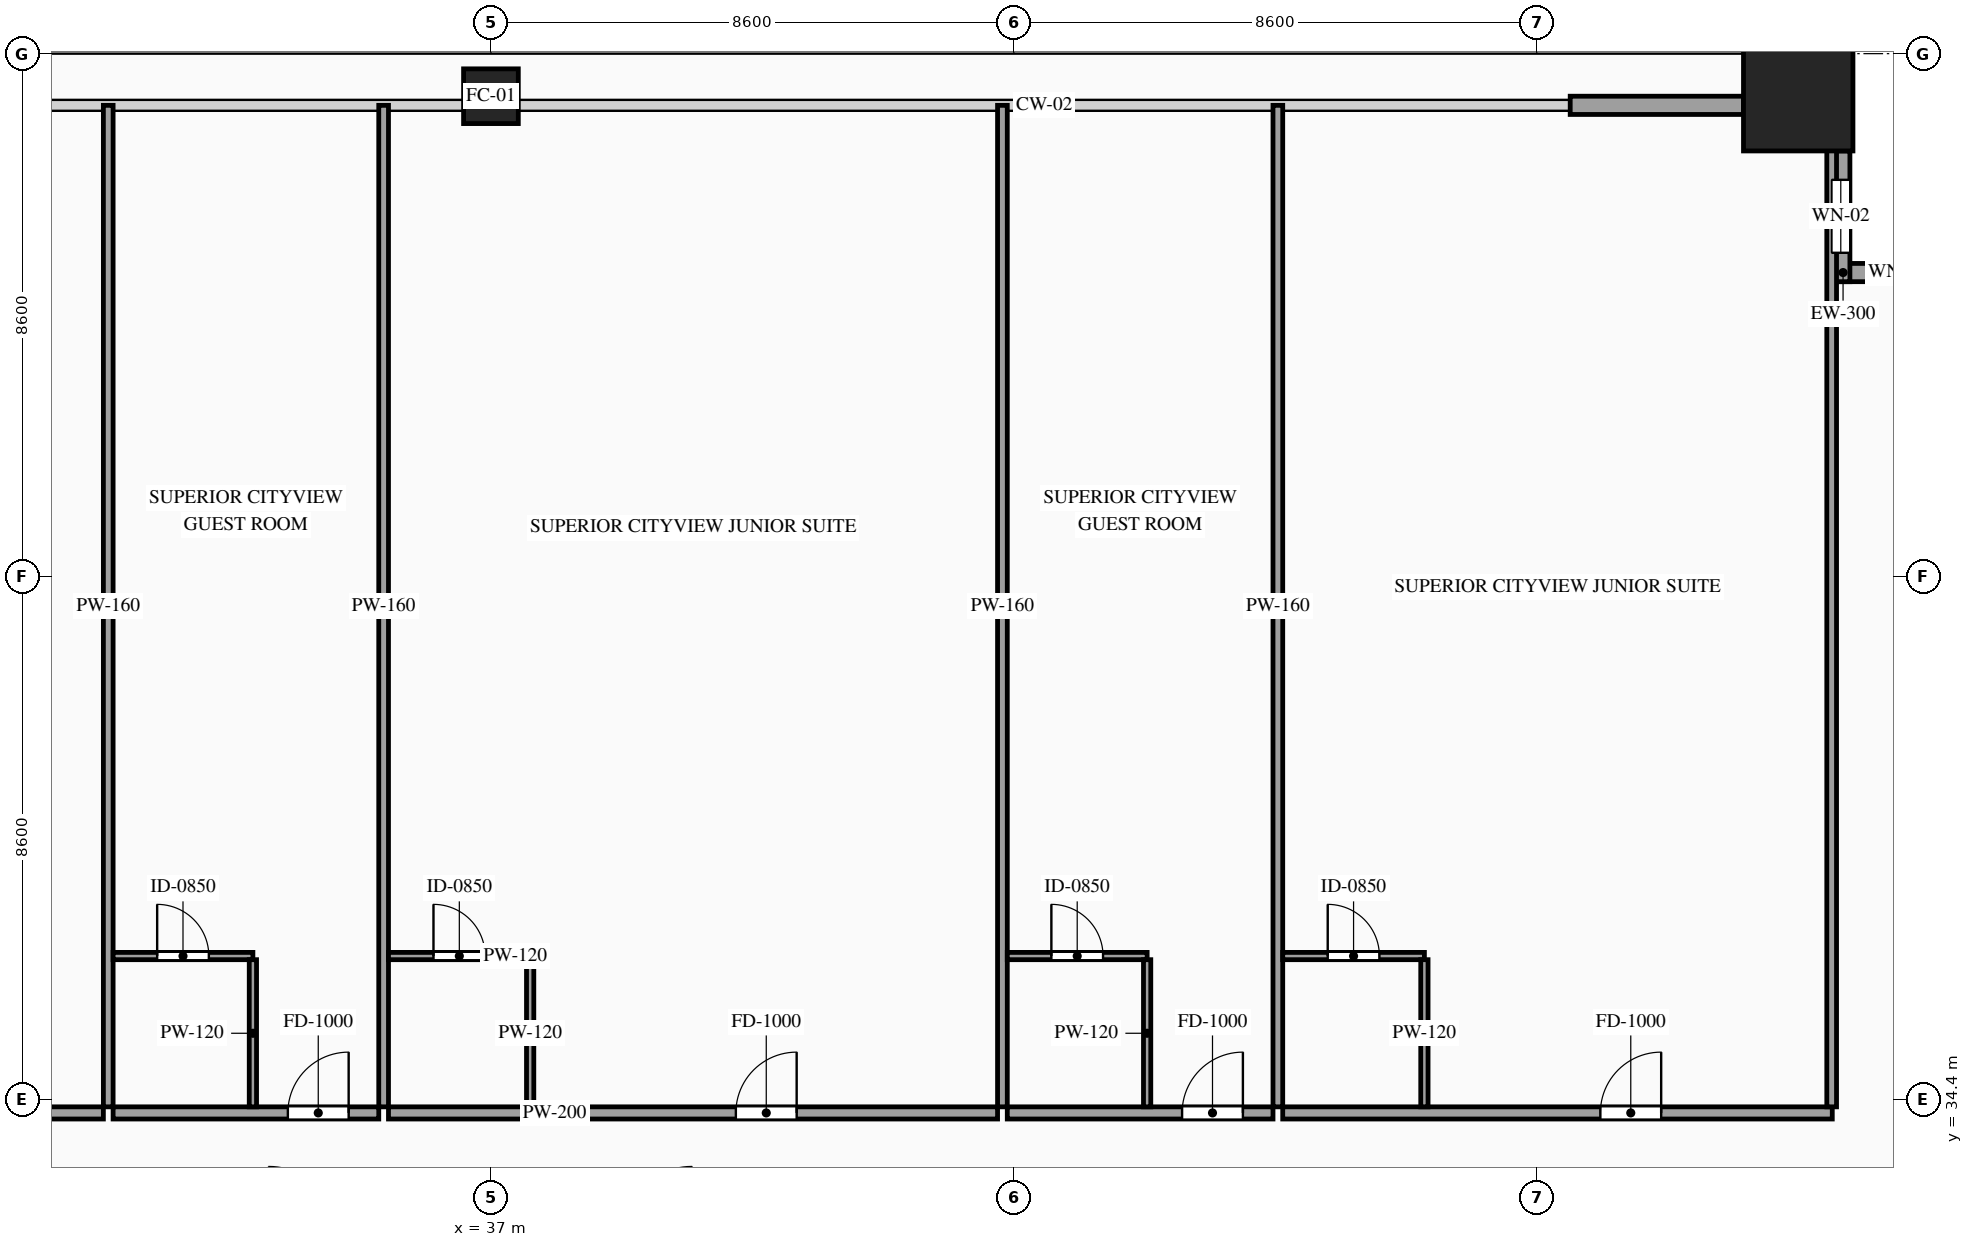
"""IFC4 building model, lengths in metres.
Left out: names, types, materials, properties, quantities, classifications, styles, units other than length and angle.
Written with IfcOpenShell. Run it as: python <this file> out.ifc"""

import sys

from ifc_helpers import new_model, si_unit, direction, frame, frame_2d, origin, origin_2d, place, context, subcontext, project, spatial, rectangle, hollow_rectangle, extrude, source, transform, mapped, element, fill, save


model = new_model("IFC4")
c1 = context("Model", 3, precision=1e-05, world=origin(), true_north=direction((0.0, 1.0)))
c2 = subcontext(c1, "Body", "Model", "MODEL_VIEW")
j1 = project(units=[si_unit("LENGTHUNIT", "METRE"), si_unit("PLANEANGLEUNIT", "RADIAN")], contexts=[c1])
p1 = place(None, origin())
s1 = spatial("IfcSite", under=j1, at=p1, CompositionType="ELEMENT")
p2 = place(p1, origin())
s2 = spatial("IfcBuilding", under=s1, at=p2, CompositionType="ELEMENT")
p3 = place(p2, frame((0.0, 0.0, 74.8)))
s3 = spatial("IfcBuildingStorey", under=s2, at=p3, CompositionType="ELEMENT", Elevation=74.8)
m1 = source(origin(), c2, "Body", "SweptSolid", [
    extrude(hollow_rectangle(XDim=0.9, YDim=0.9, WallThickness=0.042, at=origin_2d()), origin(), (0.0, 0.0, 1.0), 3.6),
])
p4 = place(p3, frame((37.0, 50.9, 0.0), z_axis=(0.0, 0.0, 1.0), x_axis=(1.0, 0.0, 0.0)))
e1 = element("IfcColumn", 1, at=p4, inside=s3, PredefinedType="COLUMN", context=c2, shape_type="MappedRepresentation", body=[
    mapped(m1, transform((0.0, 0.0, 0.0), scale=1.0)),
])
m2 = source(origin(), c2, "Body", "SweptSolid", [
    extrude(hollow_rectangle(XDim=1.8, YDim=1.8, WallThickness=0.08, at=origin_2d()), origin(), (0.0, 0.0, 1.0), 3.6),
])
p5 = place(p3, frame((58.5, 50.9, 0.0), z_axis=(0.0, 0.0, 1.0), x_axis=(1.0, 0.0, 0.0)))
e2 = element("IfcColumn", 2, at=p5, inside=s3, PredefinedType="COLUMN", context=c2, shape_type="MappedRepresentation", body=[
    mapped(m2, transform((0.0, 0.0, 0.0), scale=1.0)),
])
p6 = place(p3, frame((61.2, 48.0, 0.0), z_axis=(0.0, 0.0, 1.0), x_axis=(-1.0, 0.0, 0.0)))
e3 = element("IfcWall", 3, at=p6, inside=s3, PredefinedType="SOLIDWALL", context=c2, shape_type="SweptSolid", body=[
    extrude(rectangle(XDim=2.15, YDim=0.3, at=frame_2d((1.075, 0.0))), origin(), (0.0, 0.0, 1.0), 3.38),
])
p7 = place(p6, frame((0.625, 0.0, 0.85)))
e4 = element("IfcOpeningElement", 4, at=p7, cuts=e3, PredefinedType="OPENING", context=c2, shape_type="SweptSolid", body=[
    extrude(rectangle(XDim=0.9, YDim=1.5, at=frame_2d((0.45, 0.75))), frame((0.0, 0.165, 0.0), z_axis=(0.0, -1.0, 0.0), x_axis=(1.0, 0.0, 0.0)), (0.0, 0.0, 1.0), 0.33),
])
p8 = place(p3, frame((59.2, 47.85, 0.0), z_axis=(0.0, 0.0, 1.0), x_axis=(0.0, 1.0, 0.0)))
e5 = element("IfcWall", 5, at=p8, inside=s3, PredefinedType="SOLIDWALL", context=c2, shape_type="SweptSolid", body=[
    extrude(rectangle(XDim=2.15, YDim=0.3, at=frame_2d((1.075, 0.0))), origin(), (0.0, 0.0, 1.0), 3.38),
])
p9 = place(p8, frame((0.475, 0.0, 0.85)))
e6 = element("IfcOpeningElement", 6, at=p9, cuts=e5, PredefinedType="OPENING", context=c2, shape_type="SweptSolid", body=[
    extrude(rectangle(XDim=1.2, YDim=2.1, at=frame_2d((0.6, 1.05))), frame((0.0, 0.165, 0.0), z_axis=(0.0, -1.0, 0.0), x_axis=(1.0, 0.0, 0.0)), (0.0, 0.0, 1.0), 0.33),
])
m3 = source(origin(), c2, "Body", "SweptSolid", [
    extrude(rectangle(XDim=2.85, YDim=0.3, at=frame_2d((1.425, 0.0))), origin(), (0.0, 0.0, 1.0), 2.775),
])
p10 = place(p3, frame((54.75, 50.75, 0.0), z_axis=(0.0, 0.0, 1.0), x_axis=(1.0, 0.0, 0.0)))
e7 = element("IfcWall", 7, at=p10, inside=s3, PredefinedType="SOLIDWALL", context=c2, shape_type="MappedRepresentation", body=[
    mapped(m3, transform((0.0, 0.0, 0.0), scale=1.0)),
])
p11 = place(p3, frame((21.197, 34.18, 0.0), z_axis=(0.0, 0.0, 1.0), x_axis=(1.0, 0.0, 0.0)))
e8 = element("IfcWall", 8, at=p11, inside=s3, PredefinedType="PARTITIONING", context=c2, shape_type="SweptSolid", body=[
    extrude(rectangle(XDim=9.429, YDim=0.2, at=frame_2d((4.714, 0.0))), origin(), (0.0, 0.0, 1.0), 3.38),
])
p12 = place(p11, frame((5.42, 0.0, 0.0)))
e9 = element("IfcOpeningElement", 9, at=p12, cuts=e8, PredefinedType="OPENING", context=c2, shape_type="SweptSolid", body=[
    extrude(rectangle(XDim=1.0, YDim=2.2, at=frame_2d((0.5, 1.1))), frame((0.0, 0.115, 0.0), z_axis=(0.0, -1.0, 0.0), x_axis=(1.0, 0.0, 0.0)), (0.0, 0.0, 1.0), 0.23),
])
m4 = source(origin(), c2, "Body", "SweptSolid", [
    extrude(rectangle(XDim=16.47, YDim=0.16, at=frame_2d((8.235, 0.0))), origin(), (0.0, 0.0, 1.0), 3.38),
])
p13 = place(p3, frame((30.706, 34.28, 0.0), z_axis=(0.0, 0.0, 1.0), x_axis=(0.0, 1.0, 0.0)))
e10 = element("IfcWall", 10, at=p13, inside=s3, PredefinedType="PARTITIONING", context=c2, shape_type="MappedRepresentation", body=[
    mapped(m4, transform((0.0, 0.0, 0.0), scale=1.0)),
])
p14 = place(p3, frame((30.786, 34.18, 0.0), z_axis=(0.0, 0.0, 1.0), x_axis=(1.0, 0.0, 0.0)))
e11 = element("IfcWall", 11, at=p14, inside=s3, PredefinedType="PARTITIONING", context=c2, shape_type="SweptSolid", body=[
    extrude(rectangle(XDim=4.369, YDim=0.2, at=frame_2d((2.185, 0.0))), origin(), (0.0, 0.0, 1.0), 3.38),
])
p15 = place(p14, frame((2.874, 0.0, 0.0)))
e12 = element("IfcOpeningElement", 12, at=p15, cuts=e11, PredefinedType="OPENING", context=c2, shape_type="SweptSolid", body=[
    extrude(rectangle(XDim=1.0, YDim=2.2, at=frame_2d((0.5, 1.1))), frame((0.0, 0.115, 0.0), z_axis=(0.0, -1.0, 0.0), x_axis=(1.0, 0.0, 0.0)), (0.0, 0.0, 1.0), 0.23),
])
p16 = place(p3, frame((35.235, 34.28, 0.0), z_axis=(0.0, 0.0, 1.0), x_axis=(0.0, 1.0, 0.0)))
e13 = element("IfcWall", 13, at=p16, inside=s3, PredefinedType="PARTITIONING", context=c2, shape_type="MappedRepresentation", body=[
    mapped(m4, transform((0.0, 0.0, 0.0), scale=1.0)),
])
p17 = place(p3, frame((30.786, 36.76, 0.0), z_axis=(0.0, 0.0, 1.0), x_axis=(1.0, 0.0, 0.0)))
e14 = element("IfcWall", 14, at=p17, inside=s3, PredefinedType="PARTITIONING", context=c2, shape_type="SweptSolid", body=[
    extrude(rectangle(XDim=2.299, YDim=0.12, at=frame_2d((1.149, 0.0))), origin(), (0.0, 0.0, 1.0), 3.38),
])
p18 = place(p17, frame((0.725, 0.0, 0.0)))
e15 = element("IfcOpeningElement", 15, at=p18, cuts=e14, PredefinedType="OPENING", context=c2, shape_type="SweptSolid", body=[
    extrude(rectangle(XDim=0.85, YDim=2.1, at=frame_2d((0.425, 1.05))), frame((0.0, 0.075, 0.0), z_axis=(0.0, -1.0, 0.0), x_axis=(1.0, 0.0, 0.0)), (0.0, 0.0, 1.0), 0.15),
])
m5 = source(origin(), c2, "Body", "SweptSolid", [
    extrude(rectangle(XDim=2.42, YDim=0.12, at=frame_2d((1.21, 0.0))), origin(), (0.0, 0.0, 1.0), 3.38),
])
p19 = place(p3, frame((33.085, 34.28, 0.0), z_axis=(0.0, 0.0, 1.0), x_axis=(0.0, 1.0, 0.0)))
e16 = element("IfcWall", 16, at=p19, inside=s3, PredefinedType="PARTITIONING", context=c2, shape_type="MappedRepresentation", body=[
    mapped(m5, transform((0.0, 0.0, 0.0), scale=1.0)),
])
p20 = place(p3, frame((35.315, 34.18, 0.0), z_axis=(0.0, 0.0, 1.0), x_axis=(1.0, 0.0, 0.0)))
e17 = element("IfcWall", 17, at=p20, inside=s3, PredefinedType="PARTITIONING", context=c2, shape_type="SweptSolid", body=[
    extrude(rectangle(XDim=10.017, YDim=0.2, at=frame_2d((5.009, 0.0))), origin(), (0.0, 0.0, 1.0), 3.38),
])
p21 = place(p20, frame((5.713, 0.0, 0.0)))
e18 = element("IfcOpeningElement", 18, at=p21, cuts=e17, PredefinedType="OPENING", context=c2, shape_type="SweptSolid", body=[
    extrude(rectangle(XDim=1.0, YDim=2.2, at=frame_2d((0.5, 1.1))), frame((0.0, 0.115, 0.0), z_axis=(0.0, -1.0, 0.0), x_axis=(1.0, 0.0, 0.0)), (0.0, 0.0, 1.0), 0.23),
])
p22 = place(p3, frame((45.412, 34.28, 0.0), z_axis=(0.0, 0.0, 1.0), x_axis=(0.0, 1.0, 0.0)))
e19 = element("IfcWall", 19, at=p22, inside=s3, PredefinedType="PARTITIONING", context=c2, shape_type="MappedRepresentation", body=[
    mapped(m4, transform((0.0, 0.0, 0.0), scale=1.0)),
])
p23 = place(p3, frame((35.315, 36.76, 0.0), z_axis=(0.0, 0.0, 1.0), x_axis=(1.0, 0.0, 0.0)))
e20 = element("IfcWall", 20, at=p23, inside=s3, PredefinedType="PARTITIONING", context=c2, shape_type="SweptSolid", body=[
    extrude(rectangle(XDim=2.33, YDim=0.12, at=frame_2d((1.165, 0.0))), origin(), (0.0, 0.0, 1.0), 3.38),
])
p24 = place(p23, frame((0.74, 0.0, 0.0)))
e21 = element("IfcOpeningElement", 21, at=p24, cuts=e20, PredefinedType="OPENING", context=c2, shape_type="SweptSolid", body=[
    extrude(rectangle(XDim=0.85, YDim=2.1, at=frame_2d((0.425, 1.05))), frame((0.0, 0.075, 0.0), z_axis=(0.0, -1.0, 0.0), x_axis=(1.0, 0.0, 0.0)), (0.0, 0.0, 1.0), 0.15),
])
p25 = place(p3, frame((37.645, 34.28, 0.0), z_axis=(0.0, 0.0, 1.0), x_axis=(0.0, 1.0, 0.0)))
e22 = element("IfcWall", 22, at=p25, inside=s3, PredefinedType="PARTITIONING", context=c2, shape_type="MappedRepresentation", body=[
    mapped(m5, transform((0.0, 0.0, 0.0), scale=1.0)),
])
p26 = place(p3, frame((45.492, 34.18, 0.0), z_axis=(0.0, 0.0, 1.0), x_axis=(1.0, 0.0, 0.0)))
e23 = element("IfcWall", 23, at=p26, inside=s3, PredefinedType="PARTITIONING", context=c2, shape_type="SweptSolid", body=[
    extrude(rectangle(XDim=4.37, YDim=0.2, at=frame_2d((2.185, 0.0))), origin(), (0.0, 0.0, 1.0), 3.38),
])
p27 = place(p26, frame((2.875, 0.0, 0.0)))
e24 = element("IfcOpeningElement", 24, at=p27, cuts=e23, PredefinedType="OPENING", context=c2, shape_type="SweptSolid", body=[
    extrude(rectangle(XDim=1.0, YDim=2.2, at=frame_2d((0.5, 1.1))), frame((0.0, 0.115, 0.0), z_axis=(0.0, -1.0, 0.0), x_axis=(1.0, 0.0, 0.0)), (0.0, 0.0, 1.0), 0.23),
])
p28 = place(p3, frame((49.942, 34.28, 0.0), z_axis=(0.0, 0.0, 1.0), x_axis=(0.0, 1.0, 0.0)))
e25 = element("IfcWall", 25, at=p28, inside=s3, PredefinedType="PARTITIONING", context=c2, shape_type="MappedRepresentation", body=[
    mapped(m4, transform((0.0, 0.0, 0.0), scale=1.0)),
])
p29 = place(p3, frame((45.492, 36.76, 0.0), z_axis=(0.0, 0.0, 1.0), x_axis=(1.0, 0.0, 0.0)))
e26 = element("IfcWall", 26, at=p29, inside=s3, PredefinedType="PARTITIONING", context=c2, shape_type="SweptSolid", body=[
    extrude(rectangle(XDim=2.3, YDim=0.12, at=frame_2d((1.15, 0.0))), origin(), (0.0, 0.0, 1.0), 3.38),
])
p30 = place(p29, frame((0.725, 0.0, 0.0)))
e27 = element("IfcOpeningElement", 27, at=p30, cuts=e26, PredefinedType="OPENING", context=c2, shape_type="SweptSolid", body=[
    extrude(rectangle(XDim=0.85, YDim=2.1, at=frame_2d((0.425, 1.05))), frame((0.0, 0.075, 0.0), z_axis=(0.0, -1.0, 0.0), x_axis=(1.0, 0.0, 0.0)), (0.0, 0.0, 1.0), 0.15),
])
p31 = place(p3, frame((47.792, 34.28, 0.0), z_axis=(0.0, 0.0, 1.0), x_axis=(0.0, 1.0, 0.0)))
e28 = element("IfcWall", 28, at=p31, inside=s3, PredefinedType="PARTITIONING", context=c2, shape_type="MappedRepresentation", body=[
    mapped(m5, transform((0.0, 0.0, 0.0), scale=1.0)),
])
p32 = place(p3, frame((50.022, 34.18, 0.0), z_axis=(0.0, 0.0, 1.0), x_axis=(1.0, 0.0, 0.0)))
e29 = element("IfcWall", 29, at=p32, inside=s3, PredefinedType="PARTITIONING", context=c2, shape_type="SweptSolid", body=[
    extrude(rectangle(XDim=9.038, YDim=0.2, at=frame_2d((4.519, 0.0))), origin(), (0.0, 0.0, 1.0), 3.38),
])
p33 = place(p32, frame((5.224, 0.0, 0.0)))
e30 = element("IfcOpeningElement", 30, at=p33, cuts=e29, PredefinedType="OPENING", context=c2, shape_type="SweptSolid", body=[
    extrude(rectangle(XDim=1.0, YDim=2.2, at=frame_2d((0.5, 1.1))), frame((0.0, 0.115, 0.0), z_axis=(0.0, -1.0, 0.0), x_axis=(1.0, 0.0, 0.0)), (0.0, 0.0, 1.0), 0.23),
])
m6 = source(origin(), c2, "Body", "SweptSolid", [
    extrude(rectangle(XDim=16.32, YDim=0.16, at=frame_2d((8.16, 0.0))), origin(), (0.0, 0.0, 1.0), 3.38),
])
p34 = place(p3, frame((59.05, 34.28, 0.0), z_axis=(0.0, 0.0, 1.0), x_axis=(0.0, 1.0, 0.0)))
e31 = element("IfcWall", 31, at=p34, inside=s3, PredefinedType="PARTITIONING", context=c2, shape_type="MappedRepresentation", body=[
    mapped(m6, transform((0.0, 0.0, 0.0), scale=1.0)),
])
p35 = place(p3, frame((50.022, 36.76, 0.0), z_axis=(0.0, 0.0, 1.0), x_axis=(1.0, 0.0, 0.0)))
e32 = element("IfcWall", 32, at=p35, inside=s3, PredefinedType="PARTITIONING", context=c2, shape_type="SweptSolid", body=[
    extrude(rectangle(XDim=2.33, YDim=0.12, at=frame_2d((1.165, 0.0))), origin(), (0.0, 0.0, 1.0), 3.38),
])
p36 = place(p35, frame((0.74, 0.0, 0.0)))
e33 = element("IfcOpeningElement", 33, at=p36, cuts=e32, PredefinedType="OPENING", context=c2, shape_type="SweptSolid", body=[
    extrude(rectangle(XDim=0.85, YDim=2.1, at=frame_2d((0.425, 1.05))), frame((0.0, 0.075, 0.0), z_axis=(0.0, -1.0, 0.0), x_axis=(1.0, 0.0, 0.0)), (0.0, 0.0, 1.0), 0.15),
])
p37 = place(p3, frame((52.352, 34.28, 0.0), z_axis=(0.0, 0.0, 1.0), x_axis=(0.0, 1.0, 0.0)))
e34 = element("IfcWall", 34, at=p37, inside=s3, PredefinedType="PARTITIONING", context=c2, shape_type="MappedRepresentation", body=[
    mapped(m5, transform((0.0, 0.0, 0.0), scale=1.0)),
])
m7 = source(origin(), c2, "Body", "SweptSolid", [
    extrude(rectangle(XDim=0.9, YDim=1.5, at=frame_2d((0.45, 0.75))), frame((0.0, 0.03, 0.0), z_axis=(0.0, -1.0, 0.0), x_axis=(1.0, 0.0, 0.0)), (0.0, 0.0, 1.0), 0.06),
])
p38 = place(p7, origin())
e35 = element("IfcWindow", 35, at=p38, inside=s3, PartitioningType="SINGLE_PANEL", PredefinedType="WINDOW", context=c2, shape_type="MappedRepresentation", body=[
    mapped(m7, transform((0.0, 0.0, 0.0), scale=1.0)),
])
fill(e4, e35)
m8 = source(origin(), c2, "Body", "SweptSolid", [
    extrude(rectangle(XDim=1.2, YDim=2.1, at=frame_2d((0.6, 1.05))), frame((0.0, 0.03, 0.0), z_axis=(0.0, -1.0, 0.0), x_axis=(1.0, 0.0, 0.0)), (0.0, 0.0, 1.0), 0.06),
])
p39 = place(p9, origin())
e36 = element("IfcWindow", 36, at=p39, inside=s3, PartitioningType="SINGLE_PANEL", PredefinedType="WINDOW", context=c2, shape_type="MappedRepresentation", body=[
    mapped(m8, transform((0.0, 0.0, 0.0), scale=1.0)),
])
fill(e6, e36)
m9 = source(origin(), c2, "Body", "SweptSolid", [
    extrude(rectangle(XDim=1.0, YDim=2.2, at=frame_2d((0.5, 1.1))), frame((0.0, 0.025, 0.0), z_axis=(0.0, -1.0, 0.0), x_axis=(1.0, 0.0, 0.0)), (0.0, 0.0, 1.0), 0.05),
])
p40 = place(p15, origin())
e37 = element("IfcDoor", 37, at=p40, inside=s3, OperationType="SINGLE_SWING_RIGHT", PredefinedType="DOOR", context=c2, shape_type="MappedRepresentation", body=[
    mapped(m9, transform((0.0, 0.0, 0.0), scale=1.0)),
])
fill(e12, e37)
m10 = source(origin(), c2, "Body", "SweptSolid", [
    extrude(rectangle(XDim=0.85, YDim=2.1, at=frame_2d((0.425, 1.05))), frame((0.0, 0.025, 0.0), z_axis=(0.0, -1.0, 0.0), x_axis=(1.0, 0.0, 0.0)), (0.0, 0.0, 1.0), 0.05),
])
p41 = place(p18, origin())
e38 = element("IfcDoor", 38, at=p41, inside=s3, OperationType="SINGLE_SWING_LEFT", PredefinedType="DOOR", context=c2, shape_type="MappedRepresentation", body=[
    mapped(m10, transform((0.0, 0.0, 0.0), scale=1.0)),
])
fill(e15, e38)
p42 = place(p21, origin())
e39 = element("IfcDoor", 39, at=p42, inside=s3, OperationType="SINGLE_SWING_RIGHT", PredefinedType="DOOR", context=c2, shape_type="MappedRepresentation", body=[
    mapped(m9, transform((0.0, 0.0, 0.0), scale=1.0)),
])
fill(e18, e39)
p43 = place(p24, origin())
e40 = element("IfcDoor", 40, at=p43, inside=s3, OperationType="SINGLE_SWING_LEFT", PredefinedType="DOOR", context=c2, shape_type="MappedRepresentation", body=[
    mapped(m10, transform((0.0, 0.0, 0.0), scale=1.0)),
])
fill(e21, e40)
p44 = place(p27, origin())
e41 = element("IfcDoor", 41, at=p44, inside=s3, OperationType="SINGLE_SWING_RIGHT", PredefinedType="DOOR", context=c2, shape_type="MappedRepresentation", body=[
    mapped(m9, transform((0.0, 0.0, 0.0), scale=1.0)),
])
fill(e24, e41)
p45 = place(p30, origin())
e42 = element("IfcDoor", 42, at=p45, inside=s3, OperationType="SINGLE_SWING_LEFT", PredefinedType="DOOR", context=c2, shape_type="MappedRepresentation", body=[
    mapped(m10, transform((0.0, 0.0, 0.0), scale=1.0)),
])
fill(e27, e42)
p46 = place(p33, origin())
e43 = element("IfcDoor", 43, at=p46, inside=s3, OperationType="SINGLE_SWING_RIGHT", PredefinedType="DOOR", context=c2, shape_type="MappedRepresentation", body=[
    mapped(m9, transform((0.0, 0.0, 0.0), scale=1.0)),
])
fill(e30, e43)
p47 = place(p36, origin())
e44 = element("IfcDoor", 44, at=p47, inside=s3, OperationType="SINGLE_SWING_LEFT", PredefinedType="DOOR", context=c2, shape_type="MappedRepresentation", body=[
    mapped(m10, transform((0.0, 0.0, 0.0), scale=1.0)),
])
fill(e33, e44)
save(model, sys.argv[1])
